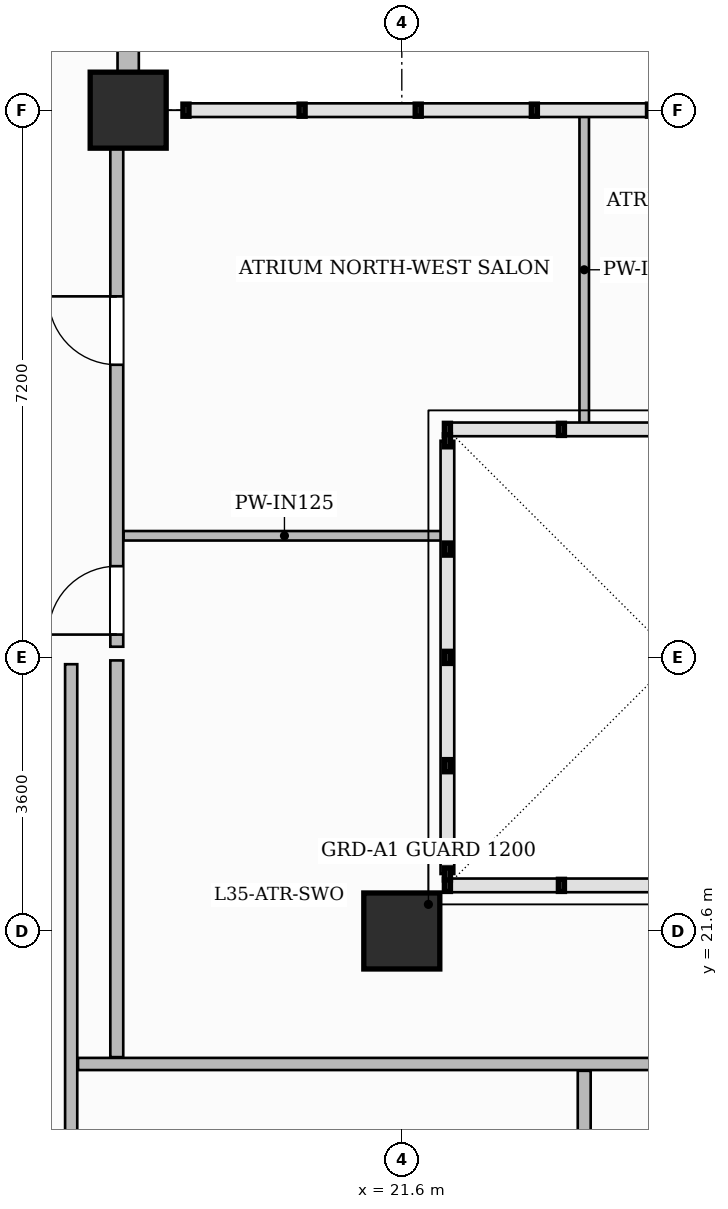
"""IFC4 building model, lengths in metres.
Left out: names, types, materials, properties, quantities, classifications, styles, units other than length and angle.
Written with IfcOpenShell. Run it as: python <this file> out.ifc"""

import sys

from ifc_helpers import new_model, si_unit, direction, frame, frame_2d, origin, origin_2d, place, context, subcontext, project, spatial, rectangle, extrude, source, transform, mapped, element, fill, save


model = new_model("IFC4")
c1 = context("Model", 3, precision=1e-05, world=origin(), true_north=direction((0.0, 1.0)))
c2 = subcontext(c1, "Body", "Model", "MODEL_VIEW")
j1 = project(units=[si_unit("LENGTHUNIT", "METRE"), si_unit("PLANEANGLEUNIT", "RADIAN")], contexts=[c1])
p1 = place(None, origin())
s1 = spatial("IfcSite", under=j1, at=p1, CompositionType="ELEMENT")
p2 = place(p1, origin())
s2 = spatial("IfcBuilding", under=s1, at=p2, CompositionType="ELEMENT")
p3 = place(p2, frame((0.0, 0.0, 141.4)))
s3 = spatial("IfcBuildingStorey", under=s2, at=p3, CompositionType="ELEMENT", Elevation=141.4)
m1 = source(origin(), c2, "Body", "SweptSolid", [
    extrude(rectangle(XDim=1.0, YDim=1.0, at=origin_2d()), origin(), (0.0, 0.0, 1.0), 3.7),
])
for number, where, z_axis, x_axis in (
    (1, (21.6, 21.6, 0.0), (0.0, 0.0, 1.0), (1.0, 0.0, 0.0)),
    (2, (18.0, 32.4, 0.0), (0.0, 0.0, 1.0), (1.0, 0.0, 0.0)),
):
    element("IfcColumn", number, at=place(p3, frame(where, z_axis=z_axis, x_axis=x_axis)), inside=s3, PredefinedType="COLUMN", context=c2, shape_type="MappedRepresentation", body=[
        mapped(m1, transform((0.0, 0.0, 0.0), scale=1.0)),
    ])
p4 = place(p3, frame((17.25, 12.16, 0.0), z_axis=(0.0, 0.0, 1.0), x_axis=(0.0, 1.0, 0.0)))
e3 = element("IfcWall", 3, at=p4, inside=s3, PredefinedType="PARTITIONING", context=c2, shape_type="SweptSolid", body=[
    extrude(rectangle(XDim=12.95, YDim=0.16, at=frame_2d((6.475, 0.0))), origin(), (0.0, 0.0, 1.0), 3.4),
])
p5 = place(p3, frame((17.85, 19.94, 0.0), z_axis=(0.0, 0.0, 1.0), x_axis=(0.0, 1.0, 0.0)))
e4 = element("IfcWall", 4, at=p5, inside=s3, PredefinedType="PARTITIONING", context=c2, shape_type="SweptSolid", body=[
    extrude(rectangle(XDim=5.22, YDim=0.17, at=frame_2d((2.61, 0.0))), origin(), (0.0, 0.0, 1.0), 3.055),
])
p6 = place(p3, frame((17.85, 25.34, 0.0), z_axis=(0.0, 0.0, 1.0), x_axis=(0.0, 1.0, 0.0)))
e5 = element("IfcWall", 5, at=p6, inside=s3, PredefinedType="PARTITIONING", context=c2, shape_type="SweptSolid", body=[
    extrude(rectangle(XDim=6.87, YDim=0.17, at=frame_2d((3.435, 0.0))), origin(), (0.0, 0.0, 1.0), 3.4),
])
p7 = place(p6, frame((0.16, 0.0, 0.0)))
e6 = element("IfcOpeningElement", 6, at=p7, cuts=e5, PredefinedType="OPENING", context=c2, shape_type="SweptSolid", body=[
    extrude(rectangle(XDim=0.9, YDim=2.15, at=frame_2d((0.45, 1.075))), frame((0.0, 0.095, 0.0), z_axis=(0.0, -1.0, 0.0), x_axis=(1.0, 0.0, 0.0)), (0.0, 0.0, 1.0), 0.19),
])
p8 = place(p6, frame((3.71, 0.0, 0.0)))
e7 = element("IfcOpeningElement", 7, at=p8, cuts=e5, PredefinedType="OPENING", context=c2, shape_type="SweptSolid", body=[
    extrude(rectangle(XDim=0.9, YDim=2.15, at=frame_2d((0.45, 1.075))), frame((0.0, 0.095, 0.0), z_axis=(0.0, -1.0, 0.0), x_axis=(1.0, 0.0, 0.0)), (0.0, 0.0, 1.0), 0.19),
])
p9 = place(p3, frame((17.94, 26.8, 0.0), z_axis=(0.0, 0.0, 1.0), x_axis=(1.0, 0.0, 0.0)))
e8 = element("IfcWall", 8, at=p9, inside=s3, PredefinedType="PARTITIONING", context=c2, shape_type="SweptSolid", body=[
    extrude(rectangle(XDim=4.232, YDim=0.125, at=frame_2d((2.116, 0.0))), origin(), (0.0, 0.0, 1.0), 3.4),
])
p10 = place(p3, frame((24.0, 28.228, 0.0), z_axis=(0.0, 0.0, 1.0), x_axis=(0.0, 1.0, 0.0)))
e9 = element("IfcWall", 9, at=p10, inside=s3, PredefinedType="PARTITIONING", context=c2, shape_type="SweptSolid", body=[
    extrude(rectangle(XDim=4.144, YDim=0.125, at=frame_2d((2.072, 0.0))), origin(), (0.0, 0.0, 1.0), 3.4),
])
p11 = place(p3, frame((17.34, 19.85, 0.0), z_axis=(0.0, 0.0, 1.0), x_axis=(1.0, 0.0, 0.0)))
e10 = element("IfcWall", 10, at=p11, inside=s3, PredefinedType="PARTITIONING", context=c2, shape_type="SweptSolid", body=[
    extrude(rectangle(XDim=10.92, YDim=0.16, at=frame_2d((5.46, 0.0))), origin(), (0.0, 0.0, 1.0), 3.4),
])
p12 = place(p3, frame((24.0, 12.16, 0.0), z_axis=(0.0, 0.0, 1.0), x_axis=(0.0, 1.0, 0.0)))
e11 = element("IfcWall", 11, at=p12, inside=s3, PredefinedType="PARTITIONING", context=c2, shape_type="SweptSolid", body=[
    extrude(rectangle(XDim=7.6, YDim=0.17, at=frame_2d((3.8, 0.0))), origin(), (0.0, 0.0, 1.0), 3.4),
])
p13 = place(p3, frame((18.0, 32.4, 0.0), z_axis=(0.0, 0.0, 1.0), x_axis=(0.0, 1.0, 0.0)))
e12 = element("IfcWall", 12, at=p13, inside=s3, PredefinedType="SOLIDWALL", context=c2, shape_type="SweptSolid", body=[
    extrude(rectangle(XDim=14.35, YDim=0.28, at=frame_2d((7.175, 0.0))), origin(), (0.0, 0.0, 1.0), 3.4),
])
p14 = place(p13, frame((1.5, 0.0, 0.0)))
e13 = element("IfcOpeningElement", 13, at=p14, cuts=e12, PredefinedType="OPENING", context=c2, shape_type="SweptSolid", body=[
    extrude(rectangle(XDim=1.2, YDim=2.2, at=frame_2d((0.6, 1.1))), frame((0.0, 0.15, 0.0), z_axis=(0.0, -1.0, 0.0), x_axis=(1.0, 0.0, 0.0)), (0.0, 0.0, 1.0), 0.3),
])
p15 = place(p13, frame((3.8, 0.0, 0.8)))
e14 = element("IfcOpeningElement", 14, at=p15, cuts=e12, PredefinedType="OPENING", context=c2, shape_type="SweptSolid", body=[
    extrude(rectangle(XDim=1.8, YDim=1.85, at=frame_2d((0.9, 0.925))), frame((0.0, 0.15, 0.0), z_axis=(0.0, -1.0, 0.0), x_axis=(1.0, 0.0, 0.0)), (0.0, 0.0, 1.0), 0.3),
])
p16 = place(p13, frame((8.525, 0.0, 0.8)))
e15 = element("IfcOpeningElement", 15, at=p16, cuts=e12, PredefinedType="OPENING", context=c2, shape_type="SweptSolid", body=[
    extrude(rectangle(XDim=1.8, YDim=1.85, at=frame_2d((0.9, 0.925))), frame((0.0, 0.15, 0.0), z_axis=(0.0, -1.0, 0.0), x_axis=(1.0, 0.0, 0.0)), (0.0, 0.0, 1.0), 0.3),
])
p17 = place(p13, frame((11.275, 0.0, 0.8)))
e16 = element("IfcOpeningElement", 16, at=p17, cuts=e12, PredefinedType="OPENING", context=c2, shape_type="SweptSolid", body=[
    extrude(rectangle(XDim=1.8, YDim=1.85, at=frame_2d((0.9, 0.925))), frame((0.0, 0.15, 0.0), z_axis=(0.0, -1.0, 0.0), x_axis=(1.0, 0.0, 0.0)), (0.0, 0.0, 1.0), 0.3),
])
m2 = source(origin(), c2, "Body", "SweptSolid", [
    extrude(rectangle(XDim=0.9, YDim=2.15, at=frame_2d((0.45, 1.075))), frame((0.0, 0.025, 0.0), z_axis=(0.0, -1.0, 0.0), x_axis=(1.0, 0.0, 0.0)), (0.0, 0.0, 1.0), 0.05),
])
p18 = place(p7, origin())
e17 = element("IfcDoor", 17, at=p18, inside=s3, OperationType="SINGLE_SWING_LEFT", PredefinedType="DOOR", context=c2, shape_type="MappedRepresentation", body=[
    mapped(m2, transform((0.0, 0.0, 0.0), scale=1.0)),
])
fill(e6, e17)
p19 = place(p8, origin())
e18 = element("IfcDoor", 18, at=p19, inside=s3, OperationType="SINGLE_SWING_RIGHT", PredefinedType="DOOR", context=c2, shape_type="MappedRepresentation", body=[
    mapped(m2, transform((0.0, 0.0, 0.0), scale=1.0)),
])
fill(e7, e18)
save(model, sys.argv[1])
